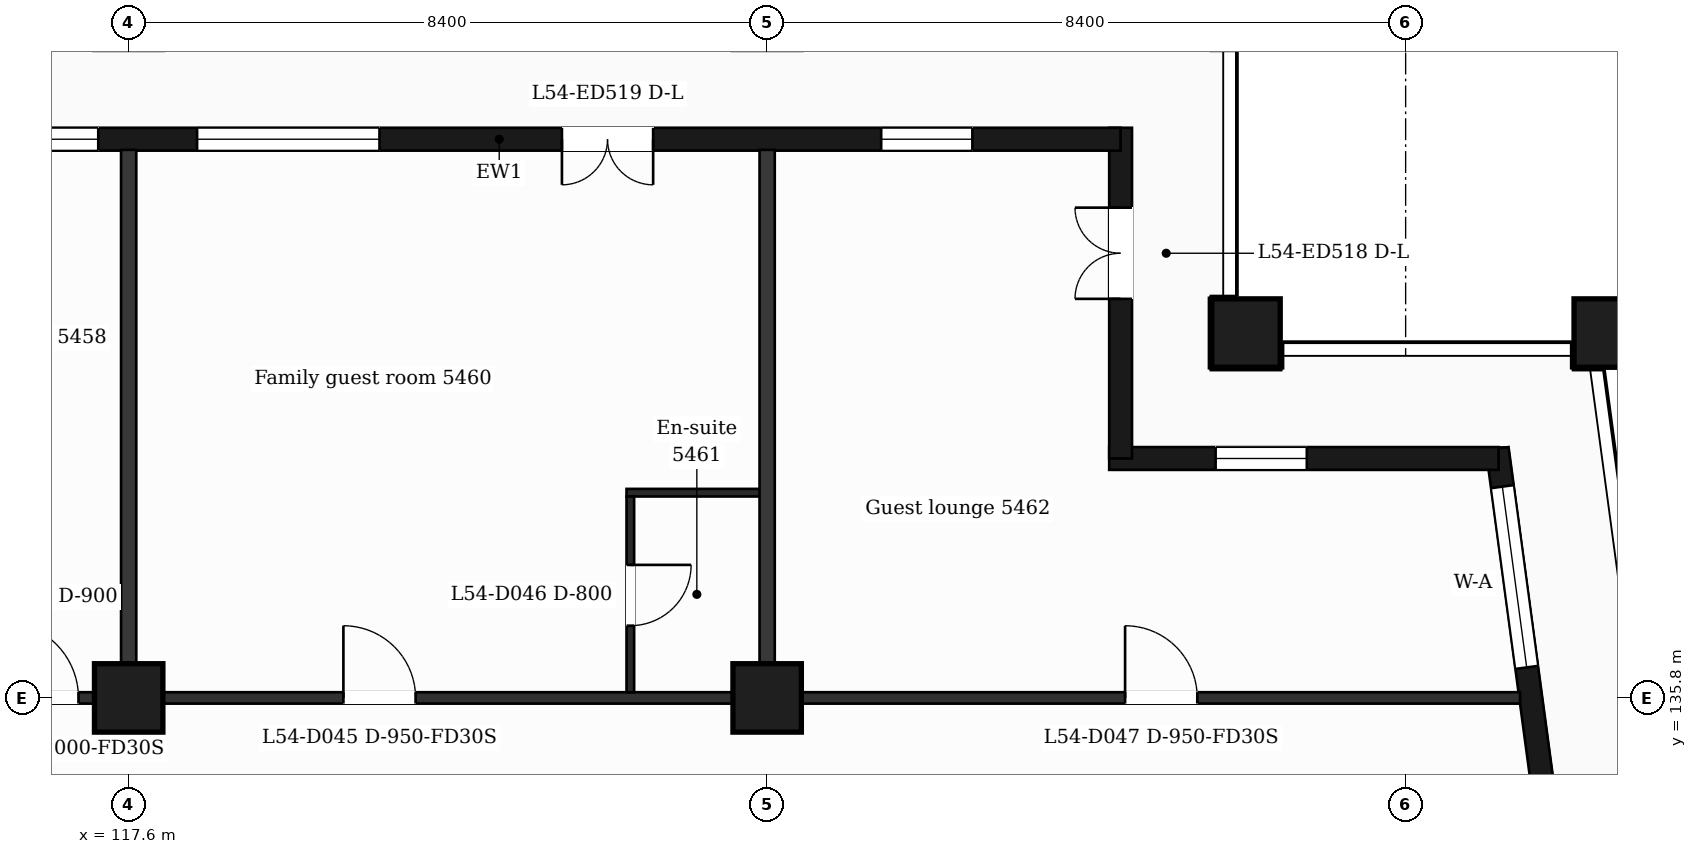
"""IFC4 building model, lengths in metres.
Left out: names, types, materials, properties, quantities, classifications, styles, units other than length and angle.
Written with IfcOpenShell. Run it as: python <this file> out.ifc"""

import sys

from ifc_helpers import new_model, si_unit, direction, frame, frame_2d, origin, origin_2d, place, context, subcontext, project, spatial, rectangle, extrude, element, fill, save


model = new_model("IFC4")
c1 = context("Model", 3, precision=1e-05, world=origin(), true_north=direction((0.0, 1.0)))
c2 = subcontext(c1, "Body", "Model", "MODEL_VIEW")
j1 = project(units=[si_unit("LENGTHUNIT", "METRE"), si_unit("PLANEANGLEUNIT", "RADIAN")], contexts=[c1])
p1 = place(None, origin())
s1 = spatial("IfcSite", under=j1, at=p1, CompositionType="ELEMENT")
p2 = place(p1, origin())
s2 = spatial("IfcBuilding", under=s1, at=p2, CompositionType="ELEMENT")
p3 = place(p2, frame((0.0, 0.0, 224.4)))
s3 = spatial("IfcBuildingStorey", under=s2, at=p3, CompositionType="ELEMENT", Elevation=224.4)
for number, where, z_axis, x_axis in (
    (1, (132.3, 140.6, 0.0), (0.0, 0.0, 1.0), (1.0, 0.0, 0.0)),
    (2, (137.065, 140.6, 0.0), (0.0, 0.0, 1.0), (1.0, 0.0, 0.0)),
    (3, (117.6, 135.8, 0.0), (0.0, 0.0, 1.0), (1.0, 0.0, 0.0)),
    (4, (126.0, 135.8, 0.0), (0.0, 0.0, 1.0), (1.0, 0.0, 0.0)),
):
    element("IfcColumn", number, at=place(p3, frame(where, z_axis=z_axis, x_axis=x_axis)), inside=s3, PredefinedType="COLUMN", context=c2, shape_type="SweptSolid", body=[
        extrude(rectangle(XDim=0.9, YDim=0.9, at=origin_2d()), origin(), (0.0, 0.0, 1.0), 3.7),
    ])
p4 = place(p3, frame((136.504, 132.4, 0.0), z_axis=(0.0, 0.0, 1.0), x_axis=(-0.133399697462, 0.99106231929, 0.0)))
e5 = element("IfcWall", 5, at=p4, inside=s3, PredefinedType="SOLIDWALL", context=c2, shape_type="SweptSolid", body=[
    extrude(rectangle(XDim=6.74, YDim=0.3, at=frame_2d((3.37, 0.0))), origin(), (0.0, 0.0, 1.0), 3.38),
])
p5 = place(p4, frame((1.115, 0.0, 0.0)))
e6 = element("IfcOpeningElement", 6, at=p5, cuts=e5, PredefinedType="OPENING", context=c2, shape_type="SweptSolid", body=[
    extrude(rectangle(XDim=1.2, YDim=2.4, at=frame_2d((0.6, 1.2))), frame((0.0, 0.16, 0.0), z_axis=(0.0, -1.0, 0.0), x_axis=(1.0, 0.0, 0.0)), (0.0, 0.0, 1.0), 0.32),
])
p6 = place(p4, frame((3.835, 0.0, 0.9)))
e7 = element("IfcOpeningElement", 7, at=p6, cuts=e5, PredefinedType="OPENING", context=c2, shape_type="SweptSolid", body=[
    extrude(rectangle(XDim=2.4, YDim=2.1, at=frame_2d((1.2, 1.05))), frame((0.0, 0.16, 0.0), z_axis=(0.0, -1.0, 0.0), x_axis=(1.0, 0.0, 0.0)), (0.0, 0.0, 1.0), 0.32),
])
p7 = place(p3, frame((135.623, 138.95, 0.0), z_axis=(0.0, 0.0, 1.0), x_axis=(-1.0, 0.0, 0.0)))
e8 = element("IfcWall", 8, at=p7, inside=s3, PredefinedType="SOLIDWALL", context=c2, shape_type="SweptSolid", body=[
    extrude(rectangle(XDim=5.123, YDim=0.3, at=frame_2d((2.561, 0.0))), origin(), (0.0, 0.0, 1.0), 3.38),
])
p8 = place(p7, frame((2.523, 0.0, 0.9)))
e9 = element("IfcOpeningElement", 9, at=p8, cuts=e8, PredefinedType="OPENING", context=c2, shape_type="SweptSolid", body=[
    extrude(rectangle(XDim=1.2, YDim=2.1, at=frame_2d((0.6, 1.05))), frame((0.0, 0.16, 0.0), z_axis=(0.0, -1.0, 0.0), x_axis=(1.0, 0.0, 0.0)), (0.0, 0.0, 1.0), 0.32),
])
p9 = place(p3, frame((130.65, 138.95, 0.0), z_axis=(0.0, 0.0, 1.0), x_axis=(0.0, 1.0, 0.0)))
e10 = element("IfcWall", 10, at=p9, inside=s3, PredefinedType="SOLIDWALL", context=c2, shape_type="SweptSolid", body=[
    extrude(rectangle(XDim=4.35, YDim=0.3, at=frame_2d((2.175, 0.0))), origin(), (0.0, 0.0, 1.0), 3.38),
])
p10 = place(p9, frame((2.1, 0.0, 0.0)))
e11 = element("IfcOpeningElement", 11, at=p10, cuts=e10, PredefinedType="OPENING", context=c2, shape_type="SweptSolid", body=[
    extrude(rectangle(XDim=1.2, YDim=2.4, at=frame_2d((0.6, 1.2))), frame((0.0, 0.16, 0.0), z_axis=(0.0, -1.0, 0.0), x_axis=(1.0, 0.0, 0.0)), (0.0, 0.0, 1.0), 0.32),
])
p11 = place(p3, frame((130.65, 143.15, 0.0), z_axis=(0.0, 0.0, 1.0), x_axis=(-1.0, 0.0, 0.0)))
e12 = element("IfcWall", 12, at=p11, inside=s3, PredefinedType="SOLIDWALL", context=c2, shape_type="SweptSolid", body=[
    extrude(rectangle(XDim=16.35, YDim=0.3, at=frame_2d((8.175, 0.0))), origin(), (0.0, 0.0, 1.0), 3.38),
])
p12 = place(p11, frame((1.95, 0.0, 0.9)))
e13 = element("IfcOpeningElement", 13, at=p12, cuts=e12, PredefinedType="OPENING", context=c2, shape_type="SweptSolid", body=[
    extrude(rectangle(XDim=1.2, YDim=2.1, at=frame_2d((0.6, 1.05))), frame((0.0, 0.16, 0.0), z_axis=(0.0, -1.0, 0.0), x_axis=(1.0, 0.0, 0.0)), (0.0, 0.0, 1.0), 0.32),
])
p13 = place(p11, frame((6.15, 0.0, 0.0)))
e14 = element("IfcOpeningElement", 14, at=p13, cuts=e12, PredefinedType="OPENING", context=c2, shape_type="SweptSolid", body=[
    extrude(rectangle(XDim=1.2, YDim=2.4, at=frame_2d((0.6, 1.2))), frame((0.0, 0.16, 0.0), z_axis=(0.0, -1.0, 0.0), x_axis=(1.0, 0.0, 0.0)), (0.0, 0.0, 1.0), 0.32),
])
p14 = place(p11, frame((9.75, 0.0, 0.9)))
e15 = element("IfcOpeningElement", 15, at=p14, cuts=e12, PredefinedType="OPENING", context=c2, shape_type="SweptSolid", body=[
    extrude(rectangle(XDim=2.4, YDim=2.1, at=frame_2d((1.2, 1.05))), frame((0.0, 0.16, 0.0), z_axis=(0.0, -1.0, 0.0), x_axis=(1.0, 0.0, 0.0)), (0.0, 0.0, 1.0), 0.32),
])
p15 = place(p11, frame((13.45, 0.0, 0.9)))
e16 = element("IfcOpeningElement", 16, at=p15, cuts=e12, PredefinedType="OPENING", context=c2, shape_type="SweptSolid", body=[
    extrude(rectangle(XDim=2.4, YDim=2.1, at=frame_2d((1.2, 1.05))), frame((0.0, 0.16, 0.0), z_axis=(0.0, -1.0, 0.0), x_axis=(1.0, 0.0, 0.0)), (0.0, 0.0, 1.0), 0.32),
])
p16 = place(p3, frame((90.895, 135.8, 0.0), z_axis=(0.0, 0.0, 1.0), x_axis=(1.0, 0.0, 0.0)))
e17 = element("IfcWall", 17, at=p16, inside=s3, PredefinedType="PARTITIONING", context=c2, shape_type="SweptSolid", body=[
    extrude(rectangle(XDim=45.011, YDim=0.15, at=frame_2d((22.505, 0.0))), origin(), (0.0, 0.0, 1.0), 3.38),
])
p17 = place(p16, frame((6.906, 0.0, 0.0)))
e18 = element("IfcOpeningElement", 18, at=p17, cuts=e17, PredefinedType="OPENING", context=c2, shape_type="SweptSolid", body=[
    extrude(rectangle(XDim=1.0, YDim=2.1, at=frame_2d((0.5, 1.05))), frame((0.0, 0.085, 0.0), z_axis=(0.0, -1.0, 0.0), x_axis=(1.0, 0.0, 0.0)), (0.0, 0.0, 1.0), 0.17),
])
p18 = place(p16, frame((15.281, 0.0, 0.0)))
e19 = element("IfcOpeningElement", 19, at=p18, cuts=e17, PredefinedType="OPENING", context=c2, shape_type="SweptSolid", body=[
    extrude(rectangle(XDim=1.0, YDim=2.1, at=frame_2d((0.5, 1.05))), frame((0.0, 0.085, 0.0), z_axis=(0.0, -1.0, 0.0), x_axis=(1.0, 0.0, 0.0)), (0.0, 0.0, 1.0), 0.17),
])
p19 = place(p16, frame((25.045, 0.0, 0.0)))
e20 = element("IfcOpeningElement", 20, at=p19, cuts=e17, PredefinedType="OPENING", context=c2, shape_type="SweptSolid", body=[
    extrude(rectangle(XDim=1.0, YDim=2.1, at=frame_2d((0.5, 1.05))), frame((0.0, 0.085, 0.0), z_axis=(0.0, -1.0, 0.0), x_axis=(1.0, 0.0, 0.0)), (0.0, 0.0, 1.0), 0.17),
])
p20 = place(p16, frame((29.531, 0.0, 0.0)))
e21 = element("IfcOpeningElement", 21, at=p20, cuts=e17, PredefinedType="OPENING", context=c2, shape_type="SweptSolid", body=[
    extrude(rectangle(XDim=0.95, YDim=2.1, at=frame_2d((0.475, 1.05))), frame((0.0, 0.085, 0.0), z_axis=(0.0, -1.0, 0.0), x_axis=(1.0, 0.0, 0.0)), (0.0, 0.0, 1.0), 0.17),
])
p21 = place(p16, frame((39.814, 0.0, 0.0)))
e22 = element("IfcOpeningElement", 22, at=p21, cuts=e17, PredefinedType="OPENING", context=c2, shape_type="SweptSolid", body=[
    extrude(rectangle(XDim=0.95, YDim=2.1, at=frame_2d((0.475, 1.05))), frame((0.0, 0.085, 0.0), z_axis=(0.0, -1.0, 0.0), x_axis=(1.0, 0.0, 0.0)), (0.0, 0.0, 1.0), 0.17),
])
p22 = place(p3, frame((124.15, 138.5, 0.0), z_axis=(0.0, 0.0, 1.0), x_axis=(1.0, 0.0, 0.0)))
e23 = element("IfcWall", 23, at=p22, inside=s3, PredefinedType="PARTITIONING", context=c2, shape_type="SweptSolid", body=[
    extrude(rectangle(XDim=1.85, YDim=0.1, at=frame_2d((0.925, 0.0))), origin(), (0.0, 0.0, 1.0), 3.38),
])
p23 = place(p3, frame((117.6, 135.875, 0.0), z_axis=(0.0, 0.0, 1.0), x_axis=(0.0, 1.0, 0.0)))
e24 = element("IfcWall", 24, at=p23, inside=s3, PredefinedType="PARTITIONING", context=c2, shape_type="SweptSolid", body=[
    extrude(rectangle(XDim=7.135, YDim=0.2, at=frame_2d((3.567, 0.0))), origin(), (0.0, 0.0, 1.0), 3.38),
])
p24 = place(p3, frame((124.2, 135.875, 0.0), z_axis=(0.0, 0.0, 1.0), x_axis=(0.0, 1.0, 0.0)))
e25 = element("IfcWall", 25, at=p24, inside=s3, PredefinedType="PARTITIONING", context=c2, shape_type="SweptSolid", body=[
    extrude(rectangle(XDim=2.575, YDim=0.1, at=frame_2d((1.288, 0.0))), origin(), (0.0, 0.0, 1.0), 3.38),
])
p25 = place(p24, frame((0.875, 0.0, 0.0)))
e26 = element("IfcOpeningElement", 26, at=p25, cuts=e25, PredefinedType="OPENING", context=c2, shape_type="SweptSolid", body=[
    extrude(rectangle(XDim=0.8, YDim=2.1, at=frame_2d((0.4, 1.05))), frame((0.0, 0.06, 0.0), z_axis=(0.0, -1.0, 0.0), x_axis=(1.0, 0.0, 0.0)), (0.0, 0.0, 1.0), 0.12),
])
p26 = place(p3, frame((126.0, 135.875, 0.0), z_axis=(0.0, 0.0, 1.0), x_axis=(0.0, 1.0, 0.0)))
e27 = element("IfcWall", 27, at=p26, inside=s3, PredefinedType="PARTITIONING", context=c2, shape_type="SweptSolid", body=[
    extrude(rectangle(XDim=7.135, YDim=0.2, at=frame_2d((3.567, 0.0))), origin(), (0.0, 0.0, 1.0), 3.38),
])
p27 = place(p6, origin())
e28 = element("IfcWindow", 28, at=p27, inside=s3, PartitioningType="SINGLE_PANEL", PredefinedType="WINDOW", context=c2, shape_type="SweptSolid", body=[
    extrude(rectangle(XDim=2.4, YDim=2.1, at=frame_2d((1.2, 1.05))), frame((0.0, 0.03, 0.0), z_axis=(0.0, -1.0, 0.0), x_axis=(1.0, 0.0, 0.0)), (0.0, 0.0, 1.0), 0.06),
])
fill(e7, e28)
p28 = place(p8, origin())
e29 = element("IfcWindow", 29, at=p28, inside=s3, PartitioningType="SINGLE_PANEL", PredefinedType="WINDOW", context=c2, shape_type="SweptSolid", body=[
    extrude(rectangle(XDim=1.2, YDim=2.1, at=frame_2d((0.6, 1.05))), frame((0.0, 0.03, 0.0), z_axis=(0.0, -1.0, 0.0), x_axis=(1.0, 0.0, 0.0)), (0.0, 0.0, 1.0), 0.06),
])
fill(e9, e29)
p29 = place(p10, origin())
e30 = element("IfcDoor", 30, at=p29, inside=s3, OperationType="DOUBLE_DOOR_SINGLE_SWING", PredefinedType="DOOR", context=c2, shape_type="SweptSolid", body=[
    extrude(rectangle(XDim=1.2, YDim=2.4, at=frame_2d((0.6, 1.2))), frame((0.0, 0.025, 0.0), z_axis=(0.0, -1.0, 0.0), x_axis=(1.0, 0.0, 0.0)), (0.0, 0.0, 1.0), 0.05),
])
fill(e11, e30)
p30 = place(p12, origin())
e31 = element("IfcWindow", 31, at=p30, inside=s3, PartitioningType="SINGLE_PANEL", PredefinedType="WINDOW", context=c2, shape_type="SweptSolid", body=[
    extrude(rectangle(XDim=1.2, YDim=2.1, at=frame_2d((0.6, 1.05))), frame((0.0, 0.03, 0.0), z_axis=(0.0, -1.0, 0.0), x_axis=(1.0, 0.0, 0.0)), (0.0, 0.0, 1.0), 0.06),
])
fill(e13, e31)
p31 = place(p13, origin())
e32 = element("IfcDoor", 32, at=p31, inside=s3, OperationType="DOUBLE_DOOR_SINGLE_SWING", PredefinedType="DOOR", context=c2, shape_type="SweptSolid", body=[
    extrude(rectangle(XDim=1.2, YDim=2.4, at=frame_2d((0.6, 1.2))), frame((0.0, 0.025, 0.0), z_axis=(0.0, -1.0, 0.0), x_axis=(1.0, 0.0, 0.0)), (0.0, 0.0, 1.0), 0.05),
])
fill(e14, e32)
p32 = place(p14, origin())
e33 = element("IfcWindow", 33, at=p32, inside=s3, PartitioningType="SINGLE_PANEL", PredefinedType="WINDOW", context=c2, shape_type="SweptSolid", body=[
    extrude(rectangle(XDim=2.4, YDim=2.1, at=frame_2d((1.2, 1.05))), frame((0.0, 0.03, 0.0), z_axis=(0.0, -1.0, 0.0), x_axis=(1.0, 0.0, 0.0)), (0.0, 0.0, 1.0), 0.06),
])
fill(e15, e33)
p33 = place(p15, origin())
e34 = element("IfcWindow", 34, at=p33, inside=s3, PartitioningType="SINGLE_PANEL", PredefinedType="WINDOW", context=c2, shape_type="SweptSolid", body=[
    extrude(rectangle(XDim=2.4, YDim=2.1, at=frame_2d((1.2, 1.05))), frame((0.0, 0.03, 0.0), z_axis=(0.0, -1.0, 0.0), x_axis=(1.0, 0.0, 0.0)), (0.0, 0.0, 1.0), 0.06),
])
fill(e16, e34)
p34 = place(p19, origin())
e35 = element("IfcDoor", 35, at=p34, inside=s3, OperationType="SINGLE_SWING_LEFT", PredefinedType="DOOR", context=c2, shape_type="SweptSolid", body=[
    extrude(rectangle(XDim=1.0, YDim=2.1, at=frame_2d((0.5, 1.05))), frame((0.0, 0.025, 0.0), z_axis=(0.0, -1.0, 0.0), x_axis=(1.0, 0.0, 0.0)), (0.0, 0.0, 1.0), 0.05),
])
fill(e20, e35)
p35 = place(p20, origin())
e36 = element("IfcDoor", 36, at=p35, inside=s3, OperationType="SINGLE_SWING_LEFT", PredefinedType="DOOR", context=c2, shape_type="SweptSolid", body=[
    extrude(rectangle(XDim=0.95, YDim=2.1, at=frame_2d((0.475, 1.05))), frame((0.0, 0.025, 0.0), z_axis=(0.0, -1.0, 0.0), x_axis=(1.0, 0.0, 0.0)), (0.0, 0.0, 1.0), 0.05),
])
fill(e21, e36)
p36 = place(p25, origin())
e37 = element("IfcDoor", 37, at=p36, inside=s3, OperationType="SINGLE_SWING_RIGHT", PredefinedType="DOOR", context=c2, shape_type="SweptSolid", body=[
    extrude(rectangle(XDim=0.8, YDim=2.1, at=frame_2d((0.4, 1.05))), frame((0.0, 0.025, 0.0), z_axis=(0.0, -1.0, 0.0), x_axis=(1.0, 0.0, 0.0)), (0.0, 0.0, 1.0), 0.05),
])
fill(e26, e37)
p37 = place(p21, origin())
e38 = element("IfcDoor", 38, at=p37, inside=s3, OperationType="SINGLE_SWING_LEFT", PredefinedType="DOOR", context=c2, shape_type="SweptSolid", body=[
    extrude(rectangle(XDim=0.95, YDim=2.1, at=frame_2d((0.475, 1.05))), frame((0.0, 0.025, 0.0), z_axis=(0.0, -1.0, 0.0), x_axis=(1.0, 0.0, 0.0)), (0.0, 0.0, 1.0), 0.05),
])
fill(e22, e38)
save(model, sys.argv[1])
